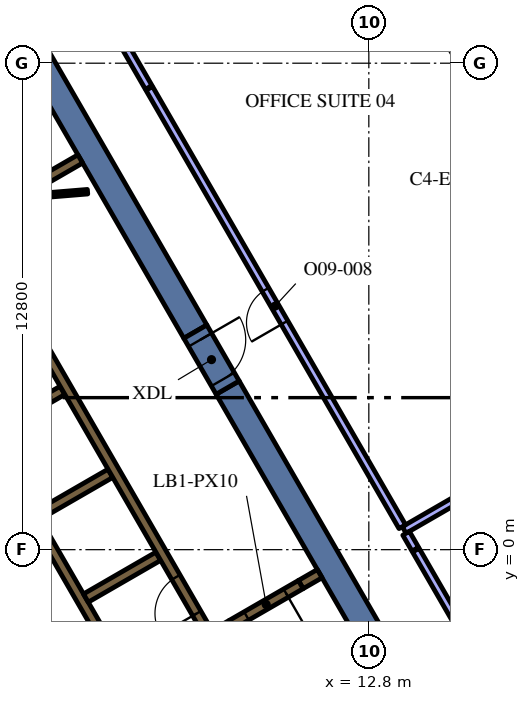
"""IFC4 building model, lengths in metres.
Left out: names, types, materials, properties, quantities, classifications, styles, units other than length and angle.
Written with IfcOpenShell. Run it as: python <this file> out.ifc"""

import sys

from ifc_helpers import new_model, si_unit, direction, frame, frame_2d, origin, place, context, subcontext, project, spatial, rectangle, extrude, element, fill, save


model = new_model("IFC4")
c1 = context("Model", 3, precision=1e-05, world=origin(), true_north=direction((0.0, 1.0)))
c2 = subcontext(c1, "Body", "Model", "MODEL_VIEW")
j1 = project(units=[si_unit("LENGTHUNIT", "METRE"), si_unit("PLANEANGLEUNIT", "RADIAN")], contexts=[c1])
p1 = place(None, origin())
s1 = spatial("IfcSite", under=j1, at=p1, CompositionType="ELEMENT")
p2 = place(p1, origin())
s2 = spatial("IfcBuilding", under=s1, at=p2, CompositionType="ELEMENT")
p3 = place(p2, frame((0.0, 0.0, 239.4)))
s3 = spatial("IfcBuildingStorey", under=s2, at=p3, CompositionType="ELEMENT", Elevation=239.4)
for number, where, z_axis, x_axis in (
    (1, (9.085, 4.264, 0.0), (0.0, 0.0, 1.0), (0.5, -0.866, 0.0)),
    (2, (8.235, 5.736, 0.0), (0.0, 0.0, 1.0), (-0.5, 0.866, 0.0)),
):
    element("IfcWall", number, at=place(p3, frame(where, z_axis=z_axis, x_axis=x_axis)), inside=s3, PredefinedType="SOLIDWALL", context=c2, shape_type="SweptSolid", body=[
        extrude(rectangle(XDim=12.472, YDim=0.7, at=frame_2d((6.236, 0.0))), origin(), (0.0, 0.0, 1.0), 4.2),
    ])
p4 = place(p3, frame((11.507, -0.631, 0.0), z_axis=(0.0, 0.0, 1.0), x_axis=(-0.866093731455, -0.499881634324, 0.0)))
e3 = element("IfcWall", 3, at=p4, inside=s3, PredefinedType="SOLIDWALL", context=c2, shape_type="SweptSolid", body=[
    extrude(rectangle(XDim=0.575, YDim=0.25, at=frame_2d((0.288, 0.0))), origin(), (0.0, 0.0, 1.0), 4.2),
])
p5 = place(p3, frame((6.568, -3.627, 0.0), z_axis=(0.0, 0.0, 1.0), x_axis=(-0.499999455981, 0.866025717874, 0.0)))
e4 = element("IfcWall", 4, at=p5, inside=s3, PredefinedType="SOLIDWALL", context=c2, shape_type="SweptSolid", body=[
    extrude(rectangle(XDim=11.978, YDim=0.25, at=frame_2d((5.989, 0.0))), origin(), (0.0, 0.0, 1.0), 4.2),
])
for number, where, z_axis, x_axis in (
    (5, (2.834, 3.091, 0.0), (0.0, 0.0, 1.0), (0.866, 0.5, 0.0)),
    (6, (4.094, 0.909, 0.0), (0.0, 0.0, 1.0), (0.866, 0.5, 0.0)),
    (7, (5.354, -1.274, 0.0), (0.0, 0.0, 1.0), (0.866, 0.5, 0.0)),
):
    element("IfcWall", number, at=place(p3, frame(where, z_axis=z_axis, x_axis=x_axis)), inside=s3, PredefinedType="SOLIDWALL", context=c2, shape_type="SweptSolid", body=[
        extrude(rectangle(XDim=2.2, YDim=0.25, at=frame_2d((1.1, 0.0))), origin(), (0.0, 0.0, 1.0), 4.2),
    ])
p6 = place(p3, frame((6.614, -3.456, 0.0), z_axis=(0.0, 0.0, 1.0), x_axis=(0.866032512851, 0.499987686533, 0.0)))
e8 = element("IfcWall", 8, at=p6, inside=s3, PredefinedType="SOLIDWALL", context=c2, shape_type="SweptSolid", body=[
    extrude(rectangle(XDim=2.975, YDim=0.25, at=frame_2d((1.487, 0.0))), origin(), (0.0, 0.0, 1.0), 4.2),
])
p7 = place(p3, frame((3.83, 9.486, 0.0), z_axis=(0.0, 0.0, 1.0), x_axis=(0.865986202621, 0.500067892261, 0.0)))
e9 = element("IfcWall", 9, at=p7, inside=s3, PredefinedType="SOLIDWALL", context=c2, shape_type="SweptSolid", body=[
    extrude(rectangle(XDim=1.591, YDim=0.25, at=frame_2d((0.795, 0.0))), origin(), (0.0, 0.0, 1.0), 4.2),
])
p8 = place(p3, frame((8.565, -2.185, 0.0), z_axis=(0.0, 0.0, 1.0), x_axis=(-0.499997954832, 0.866026584559, 0.0)))
e10 = element("IfcWall", 10, at=p8, inside=s3, PredefinedType="SOLIDWALL", context=c2, shape_type="SweptSolid", body=[
    extrude(rectangle(XDim=12.35, YDim=0.25, at=frame_2d((6.175, 0.0))), origin(), (0.0, 0.0, 1.0), 4.2),
])
p9 = place(p8, frame((0.585, 0.0, 0.0)))
e11 = element("IfcOpeningElement", 11, at=p9, cuts=e10, PredefinedType="OPENING", context=c2, shape_type="SweptSolid", body=[
    extrude(rectangle(XDim=1.1, YDim=2.1, at=frame_2d((0.55, 1.05))), frame((0.0, 0.135, 0.0), z_axis=(0.0, -1.0, 0.0), x_axis=(1.0, 0.0, 0.0)), (0.0, 0.0, 1.0), 0.27),
])
p10 = place(p3, frame((5.398, 9.419, 0.0), z_axis=(0.0, 0.0, 1.0), x_axis=(-0.996653416376, -0.081743303248, 0.0)))
e12 = element("IfcWall", 12, at=p10, inside=s3, PredefinedType="PARTITIONING", context=c2, shape_type="SweptSolid", body=[
    extrude(rectangle(XDim=2.7, YDim=0.12, at=frame_2d((1.35, 0.0))), origin(), (0.0, 0.0, 1.0), 3.45),
])
p11 = place(p10, frame((1.45, 0.0, 0.0)))
e13 = element("IfcOpeningElement", 13, at=p11, cuts=e12, PredefinedType="OPENING", context=c2, shape_type="SweptSolid", body=[
    extrude(rectangle(XDim=0.9, YDim=2.1, at=frame_2d((0.45, 1.05))), frame((0.0, 0.07, 0.0), z_axis=(0.0, -1.0, 0.0), x_axis=(1.0, 0.0, 0.0)), (0.0, 0.0, 1.0), 0.14),
])
p12 = place(p3, frame((11.009, -0.919, 0.0), z_axis=(0.0, 0.0, 1.0), x_axis=(-0.866059744384, -0.49994051562, 0.0)))
e14 = element("IfcWall", 14, at=p12, inside=s3, PredefinedType="SOLIDWALL", context=c2, shape_type="SweptSolid", body=[
    extrude(rectangle(XDim=2.1, YDim=0.25, at=frame_2d((1.05, 0.0))), origin(), (0.0, 0.0, 1.0), 4.2),
])
p13 = place(p12, frame((0.45, 0.0, 0.0)))
e15 = element("IfcOpeningElement", 15, at=p13, cuts=e14, PredefinedType="OPENING", context=c2, shape_type="SweptSolid", body=[
    extrude(rectangle(XDim=1.2, YDim=2.1, at=frame_2d((0.6, 1.05))), frame((0.0, 0.135, 0.0), z_axis=(0.0, -1.0, 0.0), x_axis=(1.0, 0.0, 0.0)), (0.0, 0.0, 1.0), 0.27),
])
p14 = place(p3, frame((8.235, 5.736, 0.0), z_axis=(0.0, 0.0, 1.0), x_axis=(0.499954529098, -0.86605165483, 0.0)))
e16 = element("IfcWall", 16, at=p14, inside=s3, PredefinedType="SOLIDWALL", context=c2, shape_type="SweptSolid", body=[
    extrude(rectangle(XDim=1.7, YDim=0.7, at=frame_2d((0.85, 0.0))), origin(), (0.0, 0.0, 1.0), 4.2),
])
p15 = place(p14, frame((0.25, 0.0, 0.0)))
e17 = element("IfcOpeningElement", 17, at=p15, cuts=e16, PredefinedType="OPENING", context=c2, shape_type="SweptSolid", body=[
    extrude(rectangle(XDim=1.2, YDim=2.1, at=frame_2d((0.6, 1.05))), frame((0.0, 0.36, 0.0), z_axis=(0.0, -1.0, 0.0), x_axis=(1.0, 0.0, 0.0)), (0.0, 0.0, 1.0), 0.72),
])
p16 = place(p3, frame((13.731, 0.518, 0.0), z_axis=(0.0, 0.0, 1.0), x_axis=(0.8660128559, 0.500021732944, 0.0)))
e18 = element("IfcWall", 18, at=p16, inside=s3, PredefinedType="PARTITIONING", context=c2, shape_type="SweptSolid", body=[
    extrude(rectangle(XDim=3.625, YDim=0.2, at=frame_2d((1.812, 0.0))), origin(), (0.0, 0.0, 1.0), 3.45),
])
p17 = place(p3, frame((14.022, 0.013, 0.0), z_axis=(0.0, 0.0, 1.0), x_axis=(-0.500159754115, 0.865933150054, 0.0)))
e19 = element("IfcWall", 19, at=p17, inside=s3, PredefinedType="PARTITIONING", context=c2, shape_type="SweptSolid", body=[
    extrude(rectangle(XDim=0.483, YDim=0.2, at=frame_2d((0.242, 0.0))), origin(), (0.0, 0.0, 1.0), 3.45),
])
p18 = place(p3, frame((17.681, -6.324, 0.0), z_axis=(0.0, 0.0, 1.0), x_axis=(-0.50002695829, 0.866009838849, 0.0)))
e20 = element("IfcWall", 20, at=p18, inside=s3, PredefinedType="PARTITIONING", context=c2, shape_type="SweptSolid", body=[
    extrude(rectangle(XDim=7.287, YDim=0.2, at=frame_2d((3.644, 0.0))), origin(), (0.0, 0.0, 1.0), 3.45),
])
p19 = place(p18, frame((3.1, 0.0, 0.0)))
e21 = element("IfcOpeningElement", 21, at=p19, cuts=e20, PredefinedType="OPENING", context=c2, shape_type="SweptSolid", body=[
    extrude(rectangle(XDim=1.0, YDim=2.1, at=frame_2d((0.5, 1.05))), frame((0.0, 0.11, 0.0), z_axis=(0.0, -1.0, 0.0), x_axis=(1.0, 0.0, 0.0)), (0.0, 0.0, 1.0), 0.22),
])
p20 = place(p3, frame((13.681, 0.604, 0.0), z_axis=(0.0, 0.0, 1.0), x_axis=(-0.500001759768, 0.86602438778, 0.0)))
e22 = element("IfcWall", 22, at=p20, inside=s3, PredefinedType="PARTITIONING", context=c2, shape_type="SweptSolid", body=[
    extrude(rectangle(XDim=13.317, YDim=0.2, at=frame_2d((6.658, 0.0))), origin(), (0.0, 0.0, 1.0), 3.45),
])
p21 = place(p20, frame((6.2, 0.0, 0.0)))
e23 = element("IfcOpeningElement", 23, at=p21, cuts=e22, PredefinedType="OPENING", context=c2, shape_type="SweptSolid", body=[
    extrude(rectangle(XDim=1.0, YDim=2.1, at=frame_2d((0.5, 1.05))), frame((0.0, 0.11, 0.0), z_axis=(0.0, -1.0, 0.0), x_axis=(1.0, 0.0, 0.0)), (0.0, 0.0, 1.0), 0.22),
])
p22 = place(p3, frame((7.007, 12.163, 0.0), z_axis=(0.0, 0.0, 1.0), x_axis=(-0.499986040413, 0.866033463206, 0.0)))
e24 = element("IfcWall", 24, at=p22, inside=s3, PredefinedType="PARTITIONING", context=c2, shape_type="SweptSolid", body=[
    extrude(rectangle(XDim=5.693, YDim=0.2, at=frame_2d((2.846, 0.0))), origin(), (0.0, 0.0, 1.0), 3.45),
])
p23 = place(p3, frame((16.782, 10.331, 0.0), z_axis=(0.0, 0.0, 1.0), x_axis=(-0.517846166225, 0.855473756538, 0.0)))
e25 = element("IfcWall", 25, at=p23, inside=s3, PredefinedType="SOLIDWALL", context=c2, shape_type="SweptSolid", body=[
    extrude(rectangle(XDim=5.298, YDim=0.24, at=frame_2d((2.649, 0.0))), origin(), (0.0, 0.0, 1.0), 3.95),
])
p24 = place(p23, frame((0.294, 0.0, 0.9)))
e26 = element("IfcOpeningElement", 26, at=p24, cuts=e25, PredefinedType="OPENING", context=c2, shape_type="SweptSolid", body=[
    extrude(rectangle(XDim=1.5, YDim=2.55, at=frame_2d((0.75, 1.275))), frame((0.0, 0.13, 0.0), z_axis=(0.0, -1.0, 0.0), x_axis=(1.0, 0.0, 0.0)), (0.0, 0.0, 1.0), 0.26),
])
p25 = place(p23, frame((3.504, 0.0, 0.9)))
e27 = element("IfcOpeningElement", 27, at=p25, cuts=e25, PredefinedType="OPENING", context=c2, shape_type="SweptSolid", body=[
    extrude(rectangle(XDim=1.5, YDim=2.55, at=frame_2d((0.75, 1.275))), frame((0.0, 0.13, 0.0), z_axis=(0.0, -1.0, 0.0), x_axis=(1.0, 0.0, 0.0)), (0.0, 0.0, 1.0), 0.26),
])
p26 = place(p9, origin())
e28 = element("IfcDoor", 28, at=p26, inside=s3, OperationType="DOUBLE_DOOR_SLIDING", PredefinedType="DOOR", context=c2, shape_type="SweptSolid", body=[
    extrude(rectangle(XDim=1.1, YDim=2.1, at=frame_2d((0.55, 1.05))), frame((0.0, 0.025, 0.0), z_axis=(0.0, -1.0, 0.0), x_axis=(1.0, 0.0, 0.0)), (0.0, 0.0, 1.0), 0.05),
])
fill(e11, e28)
p27 = place(p13, origin())
e29 = element("IfcDoor", 29, at=p27, inside=s3, OperationType="SINGLE_SWING_LEFT", PredefinedType="DOOR", context=c2, shape_type="SweptSolid", body=[
    extrude(rectangle(XDim=1.2, YDim=2.1, at=frame_2d((0.6, 1.05))), frame((0.0, 0.025, 0.0), z_axis=(0.0, -1.0, 0.0), x_axis=(1.0, 0.0, 0.0)), (0.0, 0.0, 1.0), 0.05),
])
fill(e15, e29)
p28 = place(p15, origin())
e30 = element("IfcDoor", 30, at=p28, inside=s3, OperationType="SINGLE_SWING_LEFT", PredefinedType="DOOR", context=c2, shape_type="SweptSolid", body=[
    extrude(rectangle(XDim=1.2, YDim=2.1, at=frame_2d((0.6, 1.05))), frame((0.0, 0.025, 0.0), z_axis=(0.0, -1.0, 0.0), x_axis=(1.0, 0.0, 0.0)), (0.0, 0.0, 1.0), 0.05),
])
fill(e17, e30)
p29 = place(p21, origin())
e31 = element("IfcDoor", 31, at=p29, inside=s3, OperationType="SINGLE_SWING_RIGHT", PredefinedType="DOOR", context=c2, shape_type="SweptSolid", body=[
    extrude(rectangle(XDim=1.0, YDim=2.1, at=frame_2d((0.5, 1.05))), frame((0.0, 0.025, 0.0), z_axis=(0.0, -1.0, 0.0), x_axis=(1.0, 0.0, 0.0)), (0.0, 0.0, 1.0), 0.05),
])
fill(e23, e31)
save(model, sys.argv[1])
